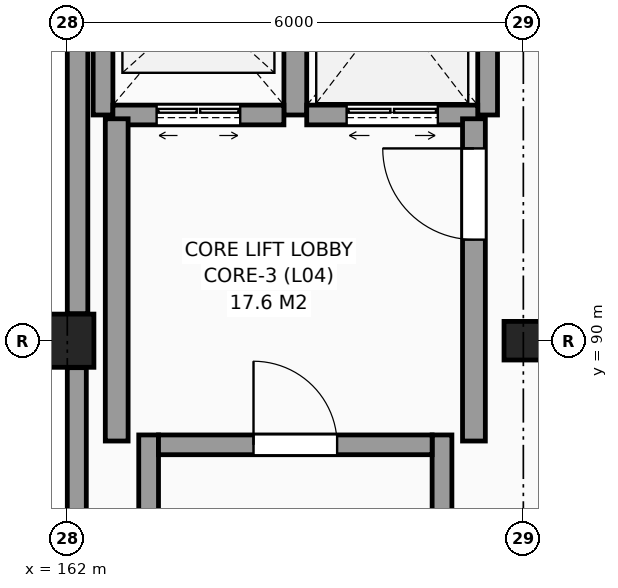
"""IFC4 building model, lengths in metres.
Left out: names, types, materials, properties, quantities, classifications, styles, units other than length and angle.
Written with IfcOpenShell. Run it as: python <this file> out.ifc"""

import sys

from ifc_helpers import new_model, si_unit, direction, frame, frame_2d, origin, origin_2d, place, context, subcontext, project, spatial, rectangle, circle, hollow_circle, extrude, element, fill, save


model = new_model("IFC4")
c1 = context("Model", 3, precision=1e-05, world=origin(), true_north=direction((0.0, 1.0)))
c2 = subcontext(c1, "Body", "Model", "MODEL_VIEW")
j1 = project(units=[si_unit("LENGTHUNIT", "METRE"), si_unit("PLANEANGLEUNIT", "RADIAN")], contexts=[c1])
p1 = place(None, origin())
s1 = spatial("IfcSite", under=j1, at=p1, CompositionType="ELEMENT")
p2 = place(p1, origin())
s2 = spatial("IfcBuilding", under=s1, at=p2, CompositionType="ELEMENT")
p3 = place(p2, frame((0.0, 0.0, 19.8)))
s3 = spatial("IfcBuildingStorey", under=s2, at=p3, CompositionType="ELEMENT", Elevation=19.8)
p4 = place(p3, frame((162.0, 90.0, 0.0), z_axis=(0.0, 0.0, 1.0), x_axis=(1.0, 0.0, 0.0)))
e1 = element("IfcColumn", 1, at=p4, inside=s3, PredefinedType="COLUMN", context=c2, shape_type="SweptSolid", body=[
    extrude(circle(Radius=0.35, at=origin_2d()), origin(), (0.0, 0.0, 1.0), 4.8),
])
p5 = place(p3, frame((168.0, 90.0, 0.0), z_axis=(0.0, 0.0, 1.0), x_axis=(1.0, 0.0, 0.0)))
e2 = element("IfcColumn", 2, at=p5, inside=s3, PredefinedType="COLUMN", context=c2, shape_type="SweptSolid", body=[
    extrude(hollow_circle(Radius=0.254, WallThickness=0.025, at=origin_2d()), origin(), (0.0, 0.0, 1.0), 4.8),
])
p6 = place(p3, frame((162.135, 95.741, 0.0), z_axis=(0.0, 0.0, 1.0), x_axis=(0.0, -1.0, 0.0)))
e3 = element("IfcWall", 3, at=p6, inside=s3, PredefinedType="SOLIDWALL", context=c2, shape_type="SweptSolid", body=[
    extrude(rectangle(XDim=5.386, YDim=0.27, at=frame_2d((2.693, 0.0))), origin(), (0.0, 0.0, 1.0), 3.9),
])
p7 = place(p3, frame((162.125, 89.645, 0.0), z_axis=(0.0, 0.0, 1.0), x_axis=(0.0, -1.0, 0.0)))
e4 = element("IfcWall", 4, at=p7, inside=s3, PredefinedType="SOLIDWALL", context=c2, shape_type="SweptSolid", body=[
    extrude(rectangle(XDim=5.315, YDim=0.25, at=frame_2d((2.657, 0.0))), origin(), (0.0, 0.0, 1.0), 3.9),
])
for number, where, z_axis, x_axis in (
    (5, (163.07, 78.04, 0.0), (0.0, 0.0, 1.0), (0.0, 1.0, 0.0)),
    (6, (166.93, 78.04, 0.0), (0.0, 0.0, 1.0), (0.0, 1.0, 0.0)),
):
    element("IfcWall", number, at=place(p3, frame(where, z_axis=z_axis, x_axis=x_axis)), inside=s3, PredefinedType="SHEAR", context=c2, shape_type="SweptSolid", body=[
        extrude(rectangle(XDim=10.72, YDim=0.26, at=frame_2d((5.36, 0.0))), origin(), (0.0, 0.0, 1.0), 4.8),
    ])
p8 = place(p3, frame((163.2, 88.63, 0.0), z_axis=(0.0, 0.0, 1.0), x_axis=(1.0, 0.0, 0.0)))
e7 = element("IfcWall", 7, at=p8, inside=s3, PredefinedType="SHEAR", context=c2, shape_type="SweptSolid", body=[
    extrude(rectangle(XDim=3.6, YDim=0.26, at=frame_2d((1.8, 0.0))), origin(), (0.0, 0.0, 1.0), 4.8),
])
p9 = place(p8, frame((1.25, 0.0, 0.0)))
e8 = element("IfcOpeningElement", 8, at=p9, cuts=e7, PredefinedType="OPENING", context=c2, shape_type="SweptSolid", body=[
    extrude(rectangle(XDim=1.1, YDim=2.15, at=frame_2d((0.55, 1.075))), frame((0.0, 0.14, 0.0), z_axis=(0.0, -1.0, 0.0), x_axis=(1.0, 0.0, 0.0)), (0.0, 0.0, 1.0), 0.28),
])
p10 = place(p3, frame((162.47, 92.97, 0.0), z_axis=(0.0, 0.0, 1.0), x_axis=(0.0, 1.0, 0.0)))
e9 = element("IfcWall", 9, at=p10, inside=s3, PredefinedType="SHEAR", context=c2, shape_type="SweptSolid", body=[
    extrude(rectangle(XDim=2.91, YDim=0.26, at=frame_2d((1.455, 0.0))), origin(), (0.0, 0.0, 1.0), 4.8),
])
p11 = place(p3, frame((165.0, 92.97, 0.0), z_axis=(0.0, 0.0, 1.0), x_axis=(0.0, 1.0, 0.0)))
e10 = element("IfcWall", 10, at=p11, inside=s3, PredefinedType="SHEAR", context=c2, shape_type="SweptSolid", body=[
    extrude(rectangle(XDim=2.91, YDim=0.3, at=frame_2d((1.455, 0.0))), origin(), (0.0, 0.0, 1.0), 4.8),
])
p12 = place(p3, frame((162.6, 92.97, 0.0), z_axis=(0.0, 0.0, 1.0), x_axis=(1.0, 0.0, 0.0)))
e11 = element("IfcWall", 11, at=p12, inside=s3, PredefinedType="SHEAR", context=c2, shape_type="SweptSolid", body=[
    extrude(rectangle(XDim=2.25, YDim=0.26, at=frame_2d((1.125, 0.0))), origin(), (0.0, 0.0, 1.0), 4.8),
])
p13 = place(p12, frame((0.575, 0.0, 0.0)))
e12 = element("IfcOpeningElement", 12, at=p13, cuts=e11, PredefinedType="OPENING", context=c2, shape_type="SweptSolid", body=[
    extrude(rectangle(XDim=1.1, YDim=2.2, at=frame_2d((0.55, 1.1))), frame((0.0, 0.14, 0.0), z_axis=(0.0, -1.0, 0.0), x_axis=(1.0, 0.0, 0.0)), (0.0, 0.0, 1.0), 0.28),
])
p14 = place(p3, frame((167.53, 92.97, 0.0), z_axis=(0.0, 0.0, 1.0), x_axis=(0.0, 1.0, 0.0)))
e13 = element("IfcWall", 13, at=p14, inside=s3, PredefinedType="SHEAR", context=c2, shape_type="SweptSolid", body=[
    extrude(rectangle(XDim=2.91, YDim=0.26, at=frame_2d((1.455, 0.0))), origin(), (0.0, 0.0, 1.0), 4.8),
])
p15 = place(p3, frame((165.15, 92.97, 0.0), z_axis=(0.0, 0.0, 1.0), x_axis=(1.0, 0.0, 0.0)))
e14 = element("IfcWall", 14, at=p15, inside=s3, PredefinedType="SHEAR", context=c2, shape_type="SweptSolid", body=[
    extrude(rectangle(XDim=2.25, YDim=0.26, at=frame_2d((1.125, 0.0))), origin(), (0.0, 0.0, 1.0), 4.8),
])
p16 = place(p15, frame((0.525, 0.0, 0.0)))
e15 = element("IfcOpeningElement", 15, at=p16, cuts=e14, PredefinedType="OPENING", context=c2, shape_type="SweptSolid", body=[
    extrude(rectangle(XDim=1.2, YDim=2.25, at=frame_2d((0.6, 1.125))), frame((0.0, 0.14, 0.0), z_axis=(0.0, -1.0, 0.0), x_axis=(1.0, 0.0, 0.0)), (0.0, 0.0, 1.0), 0.28),
])
p17 = place(p3, frame((167.35, 88.68, 0.0), z_axis=(0.0, 0.0, 1.0), x_axis=(0.0, 1.0, 0.0)))
e16 = element("IfcWall", 16, at=p17, inside=s3, PredefinedType="SHEAR", context=c2, shape_type="SweptSolid", body=[
    extrude(rectangle(XDim=4.24, YDim=0.3, at=frame_2d((2.12, 0.0))), origin(), (0.0, 0.0, 1.0), 4.8),
])
p18 = place(p17, frame((2.65, 0.0, 0.0)))
e17 = element("IfcOpeningElement", 17, at=p18, cuts=e16, PredefinedType="OPENING", context=c2, shape_type="SweptSolid", body=[
    extrude(rectangle(XDim=1.2, YDim=2.2, at=frame_2d((0.6, 1.1))), frame((0.0, 0.16, 0.0), z_axis=(0.0, -1.0, 0.0), x_axis=(1.0, 0.0, 0.0)), (0.0, 0.0, 1.0), 0.32),
])
p19 = place(p3, frame((162.65, 88.68, 0.0), z_axis=(0.0, 0.0, 1.0), x_axis=(0.0, 1.0, 0.0)))
e18 = element("IfcWall", 18, at=p19, inside=s3, PredefinedType="SHEAR", context=c2, shape_type="SweptSolid", body=[
    extrude(rectangle(XDim=4.24, YDim=0.3, at=frame_2d((2.12, 0.0))), origin(), (0.0, 0.0, 1.0), 4.8),
])
p20 = place(p9, origin())
e19 = element("IfcDoor", 19, at=p20, inside=s3, OperationType="SINGLE_SWING_LEFT", PredefinedType="DOOR", context=c2, shape_type="SweptSolid", body=[
    extrude(rectangle(XDim=1.1, YDim=2.15, at=frame_2d((0.55, 1.075))), frame((0.0, 0.025, 0.0), z_axis=(0.0, -1.0, 0.0), x_axis=(1.0, 0.0, 0.0)), (0.0, 0.0, 1.0), 0.05),
])
fill(e8, e19)
p21 = place(p13, origin())
e20 = element("IfcDoor", 20, at=p21, inside=s3, OperationType="DOUBLE_DOOR_SLIDING", PredefinedType="DOOR", context=c2, shape_type="SweptSolid", body=[
    extrude(rectangle(XDim=1.1, YDim=2.2, at=frame_2d((0.55, 1.1))), frame((0.0, 0.025, 0.0), z_axis=(0.0, -1.0, 0.0), x_axis=(1.0, 0.0, 0.0)), (0.0, 0.0, 1.0), 0.05),
])
fill(e12, e20)
p22 = place(p16, origin())
e21 = element("IfcDoor", 21, at=p22, inside=s3, OperationType="DOUBLE_DOOR_SLIDING", PredefinedType="DOOR", context=c2, shape_type="SweptSolid", body=[
    extrude(rectangle(XDim=1.2, YDim=2.25, at=frame_2d((0.6, 1.125))), frame((0.0, 0.025, 0.0), z_axis=(0.0, -1.0, 0.0), x_axis=(1.0, 0.0, 0.0)), (0.0, 0.0, 1.0), 0.05),
])
fill(e15, e21)
p23 = place(p18, origin())
e22 = element("IfcDoor", 22, at=p23, inside=s3, OperationType="SINGLE_SWING_RIGHT", PredefinedType="DOOR", context=c2, shape_type="SweptSolid", body=[
    extrude(rectangle(XDim=1.2, YDim=2.2, at=frame_2d((0.6, 1.1))), frame((0.0, 0.025, 0.0), z_axis=(0.0, -1.0, 0.0), x_axis=(1.0, 0.0, 0.0)), (0.0, 0.0, 1.0), 0.05),
])
fill(e17, e22)
save(model, sys.argv[1])
